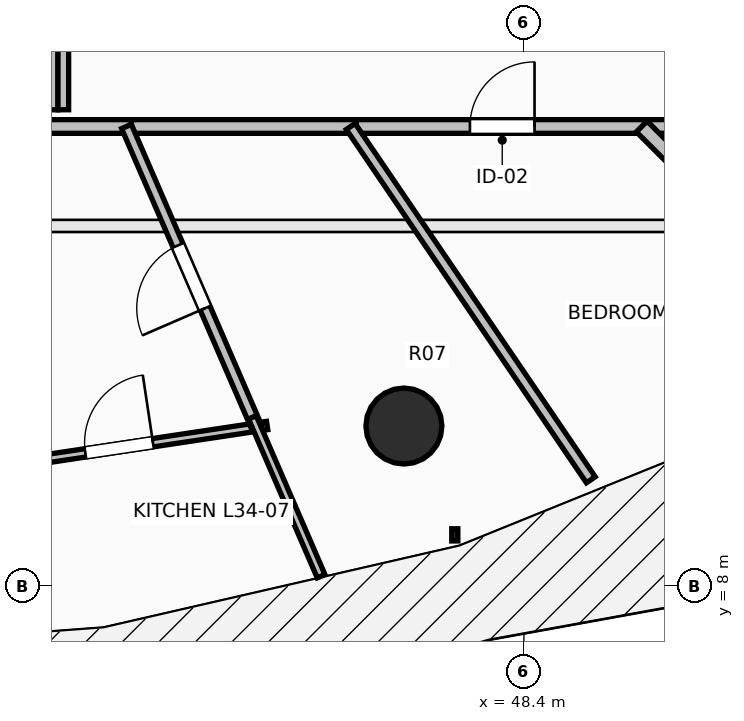
"""IFC4 building model, lengths in metres.
Left out: names, types, materials, properties, quantities, classifications, styles, units other than length and angle.
Written with IfcOpenShell. Run it as: python <this file> out.ifc"""

import sys

from ifc_helpers import new_model, si_unit, direction, frame, frame_2d, origin, origin_2d, place, context, subcontext, project, spatial, rectangle, circle, extrude, element, fill, save


model = new_model("IFC4")
c1 = context("Model", 3, precision=1e-05, world=origin(), true_north=direction((0.0, 1.0)))
c2 = subcontext(c1, "Body", "Model", "MODEL_VIEW")
j1 = project(units=[si_unit("LENGTHUNIT", "METRE"), si_unit("PLANEANGLEUNIT", "RADIAN")], contexts=[c1])
p1 = place(None, origin())
s1 = spatial("IfcSite", under=j1, at=p1, CompositionType="ELEMENT")
p2 = place(p1, origin())
s2 = spatial("IfcBuilding", under=s1, at=p2, CompositionType="ELEMENT")
p3 = place(p2, frame((0.0, 0.0, 129.1)))
s3 = spatial("IfcBuildingStorey", under=s2, at=p3, CompositionType="ELEMENT", Elevation=129.1)
p4 = place(p3, frame((46.821, 10.109, 0.0), z_axis=(0.0, 0.0, 1.0), x_axis=(0.382683432365, -0.923879532511, 0.0)))
e1 = element("IfcColumn", 1, at=p4, inside=s3, PredefinedType="COLUMN", context=c2, shape_type="SweptSolid", body=[
    extrude(circle(Radius=0.5, at=origin_2d()), origin(), (0.0, 0.0, 1.0), 3.5),
])
p5 = place(p3, frame((40.111, 14.05, 0.0), z_axis=(0.0, 0.0, 1.0), x_axis=(1.0, 0.0, 0.0)))
e2 = element("IfcWall", 2, at=p5, inside=s3, PredefinedType="PARTITIONING", context=c2, shape_type="SweptSolid", body=[
    extrude(rectangle(XDim=3.125, YDim=0.18, at=frame_2d((1.562, 0.0))), origin(), (0.0, 0.0, 1.0), 3.24),
])
p6 = place(p5, frame((0.782, 0.0, 0.0)))
e3 = element("IfcOpeningElement", 3, at=p6, cuts=e2, PredefinedType="OPENING", context=c2, shape_type="SweptSolid", body=[
    extrude(rectangle(XDim=1.0, YDim=2.15, at=frame_2d((0.5, 1.075))), frame((0.0, 0.105, 0.0), z_axis=(0.0, -1.0, 0.0), x_axis=(1.0, 0.0, 0.0)), (0.0, 0.0, 1.0), 0.21),
])
p7 = place(p3, frame((43.236, 14.05, 0.0), z_axis=(0.0, 0.0, 1.0), x_axis=(1.0, 0.0, 0.0)))
e4 = element("IfcWall", 4, at=p7, inside=s3, PredefinedType="PARTITIONING", context=c2, shape_type="SweptSolid", body=[
    extrude(rectangle(XDim=2.958, YDim=0.18, at=frame_2d((1.479, 0.0))), origin(), (0.0, 0.0, 1.0), 2.432),
])
p8 = place(p3, frame((46.194, 14.05, 0.0), z_axis=(0.0, 0.0, 1.0), x_axis=(1.0, 0.0, 0.0)))
e5 = element("IfcWall", 5, at=p8, inside=s3, PredefinedType="PARTITIONING", context=c2, shape_type="SweptSolid", body=[
    extrude(rectangle(XDim=3.841, YDim=0.18, at=frame_2d((1.92, 0.0))), origin(), (0.0, 0.0, 1.0), 2.432),
])
p9 = place(p8, frame((1.496, 0.0, 0.0)))
e6 = element("IfcOpeningElement", 6, at=p9, cuts=e5, PredefinedType="OPENING", context=c2, shape_type="SweptSolid", body=[
    extrude(rectangle(XDim=0.85, YDim=2.1, at=frame_2d((0.425, 1.05))), frame((0.0, 0.105, 0.0), z_axis=(0.0, -1.0, 0.0), x_axis=(1.0, 0.0, 0.0)), (0.0, 0.0, 1.0), 0.21),
])
p10 = place(p3, frame((50.035, 14.05, 0.0), z_axis=(0.0, 0.0, 1.0), x_axis=(1.0, 0.0, 0.0)))
e7 = element("IfcWall", 7, at=p10, inside=s3, PredefinedType="PARTITIONING", context=c2, shape_type="SweptSolid", body=[
    extrude(rectangle(XDim=0.765, YDim=0.18, at=frame_2d((0.383, 0.0))), origin(), (0.0, 0.0, 1.0), 2.874),
])
p11 = place(p3, frame((41.128, 9.53, 0.0), z_axis=(0.0, 0.0, 1.0), x_axis=(0.988884902331, 0.148683051965, 0.0)))
e8 = element("IfcWall", 8, at=p11, inside=s3, PredefinedType="PARTITIONING", context=c2, shape_type="SweptSolid", body=[
    extrude(rectangle(XDim=3.938, YDim=0.11, at=frame_2d((1.969, 0.0))), origin(), (0.0, 0.0, 1.0), 3.24),
])
p12 = place(p11, frame((1.519, 0.0, 0.0)))
e9 = element("IfcOpeningElement", 9, at=p12, cuts=e8, PredefinedType="OPENING", context=c2, shape_type="SweptSolid", body=[
    extrude(rectangle(XDim=0.9, YDim=2.1, at=frame_2d((0.45, 1.05))), frame((0.0, 0.07, 0.0), z_axis=(0.0, -1.0, 0.0), x_axis=(1.0, 0.0, 0.0)), (0.0, 0.0, 1.0), 0.14),
])
p13 = place(p3, frame((44.883, 10.095, 0.0), z_axis=(0.0, 0.0, 1.0), x_axis=(-0.397273563399, 0.917700232006, 0.0)))
e10 = element("IfcWall", 10, at=p13, inside=s3, PredefinedType="PARTITIONING", context=c2, shape_type="SweptSolid", body=[
    extrude(rectangle(XDim=4.31, YDim=0.14, at=frame_2d((2.155, 0.0))), origin(), (0.0, 0.0, 1.0), 2.432),
])
p14 = place(p13, frame((1.705, 0.0, 0.0)))
e11 = element("IfcOpeningElement", 11, at=p14, cuts=e10, PredefinedType="OPENING", context=c2, shape_type="SweptSolid", body=[
    extrude(rectangle(XDim=0.9, YDim=2.1, at=frame_2d((0.45, 1.05))), frame((0.0, 0.085, 0.0), z_axis=(0.0, -1.0, 0.0), x_axis=(1.0, 0.0, 0.0)), (0.0, 0.0, 1.0), 0.17),
])
p15 = place(p3, frame((45.732, 8.134, 0.0), z_axis=(0.0, 0.0, 1.0), x_axis=(-0.397125966554, 0.91776411277, 0.0)))
e12 = element("IfcWall", 12, at=p15, inside=s3, PredefinedType="PARTITIONING", context=c2, shape_type="SweptSolid", body=[
    extrude(rectangle(XDim=2.277, YDim=0.11, at=frame_2d((1.139, 0.0))), origin(), (0.0, 0.0, 1.0), 2.728),
])
p16 = place(p3, frame((49.28, 9.402, 0.0), z_axis=(0.0, 0.0, 1.0), x_axis=(-0.562106811751, 0.827064648128, 0.0)))
e13 = element("IfcWall", 13, at=p16, inside=s3, PredefinedType="PARTITIONING", context=c2, shape_type="SweptSolid", body=[
    extrude(rectangle(XDim=5.62, YDim=0.14, at=frame_2d((2.81, 0.0))), origin(), (0.0, 0.0, 1.0), 2.432),
])
p17 = place(p3, frame((52.895, 11.105, 0.0), z_axis=(0.0, 0.0, 1.0), x_axis=(-0.707106781187, 0.707106781187, 0.0)))
e14 = element("IfcWall", 14, at=p17, inside=s3, PredefinedType="PARTITIONING", context=c2, shape_type="SweptSolid", body=[
    extrude(rectangle(XDim=4.165, YDim=0.2, at=frame_2d((2.083, 0.0))), origin(), (0.0, 0.0, 1.0), 2.728),
])
for number, where, z_axis, x_axis in (
    (15, (42.2, 16.1, 0.0), (0.0, 0.0, 1.0), (0.0, -1.0, 0.0)),
    (16, (42.34, 14.27, 0.0), (0.0, 0.0, 1.0), (0.0, 1.0, 0.0)),
):
    element("IfcWall", number, at=place(p3, frame(where, z_axis=z_axis, x_axis=x_axis)), inside=s3, PredefinedType="PARTITIONING", context=c2, shape_type="SweptSolid", body=[
        extrude(rectangle(XDim=1.83, YDim=0.14, at=frame_2d((0.915, 0.0))), origin(), (0.0, 0.0, 1.0), 3.24),
    ])
p18 = place(p12, origin())
e17 = element("IfcDoor", 17, at=p18, inside=s3, OperationType="SINGLE_SWING_RIGHT", PredefinedType="DOOR", context=c2, shape_type="SweptSolid", body=[
    extrude(rectangle(XDim=0.9, YDim=2.1, at=frame_2d((0.45, 1.05))), frame((0.0, 0.025, 0.0), z_axis=(0.0, -1.0, 0.0), x_axis=(1.0, 0.0, 0.0)), (0.0, 0.0, 1.0), 0.05),
])
fill(e9, e17)
p19 = place(p14, origin())
e18 = element("IfcDoor", 18, at=p19, inside=s3, OperationType="SINGLE_SWING_LEFT", PredefinedType="DOOR", context=c2, shape_type="SweptSolid", body=[
    extrude(rectangle(XDim=0.9, YDim=2.1, at=frame_2d((0.45, 1.05))), frame((0.0, 0.025, 0.0), z_axis=(0.0, -1.0, 0.0), x_axis=(1.0, 0.0, 0.0)), (0.0, 0.0, 1.0), 0.05),
])
fill(e11, e18)
p20 = place(p9, origin())
e19 = element("IfcDoor", 19, at=p20, inside=s3, OperationType="SINGLE_SWING_RIGHT", PredefinedType="DOOR", context=c2, shape_type="SweptSolid", body=[
    extrude(rectangle(XDim=0.85, YDim=2.1, at=frame_2d((0.425, 1.05))), frame((0.0, 0.025, 0.0), z_axis=(0.0, -1.0, 0.0), x_axis=(1.0, 0.0, 0.0)), (0.0, 0.0, 1.0), 0.05),
])
fill(e6, e19)
save(model, sys.argv[1])
